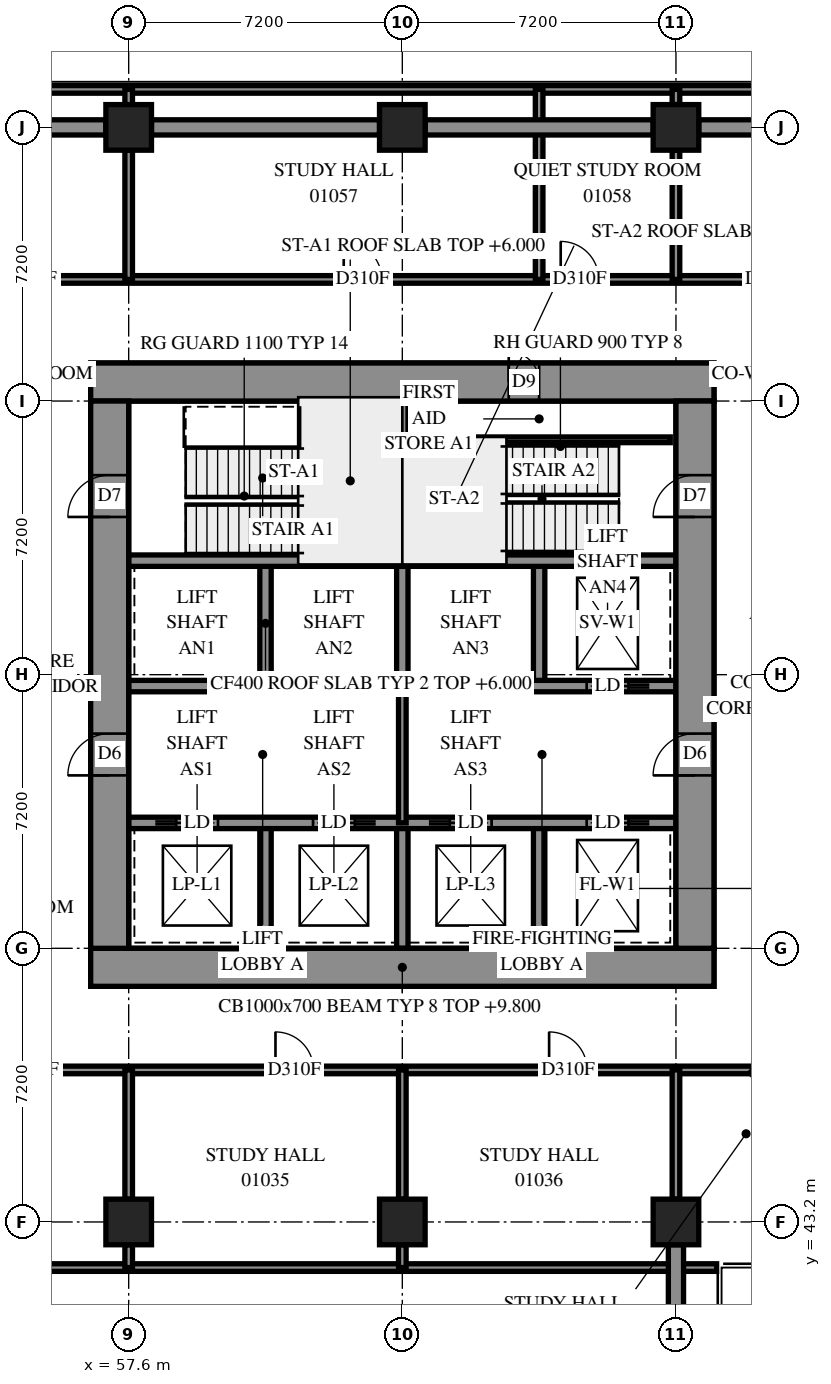
"""IFC4 building model, lengths in metres.
Left out: names, types, materials, properties, quantities, classifications, styles, units other than length and angle.
Written with IfcOpenShell. Run it as: python <this file> out.ifc"""

import sys

from ifc_helpers import new_model, si_unit, direction, frame, frame_2d, origin, origin_2d, place, context, subcontext, project, spatial, rectangle, extrude, element, fill, save


model = new_model("IFC4")
c1 = context("Model", 3, precision=1e-05, world=origin(), true_north=direction((0.0, 1.0)))
c2 = subcontext(c1, "Body", "Model", "MODEL_VIEW")
j1 = project(units=[si_unit("LENGTHUNIT", "METRE"), si_unit("PLANEANGLEUNIT", "RADIAN")], contexts=[c1])
p1 = place(None, origin())
s1 = spatial("IfcSite", under=j1, at=p1, CompositionType="ELEMENT")
p2 = place(p1, origin())
s2 = spatial("IfcBuilding", under=s1, at=p2, CompositionType="ELEMENT")
p3 = place(p2, frame((0.0, 0.0, 6.0)))
s3 = spatial("IfcBuildingStorey", under=s2, at=p3, CompositionType="ELEMENT", Elevation=6.0)
for number, where, z_axis, x_axis in (
    (1, (57.6, 43.2, 0.0), (0.0, 0.0, 1.0), (1.0, 0.0, 0.0)),
    (2, (57.6, 72.0, 0.0), (0.0, 0.0, 1.0), (1.0, 0.0, 0.0)),
    (3, (64.8, 43.2, 0.0), (0.0, 0.0, 1.0), (1.0, 0.0, 0.0)),
    (4, (64.8, 72.0, 0.0), (0.0, 0.0, 1.0), (1.0, 0.0, 0.0)),
    (5, (72.0, 43.2, 0.0), (0.0, 0.0, 1.0), (1.0, 0.0, 0.0)),
    (6, (72.0, 72.0, 0.0), (0.0, 0.0, 1.0), (1.0, 0.0, 0.0)),
):
    element("IfcColumn", number, at=place(p3, frame(where, z_axis=z_axis, x_axis=x_axis)), inside=s3, PredefinedType="COLUMN", context=c2, shape_type="SweptSolid", body=[
        extrude(rectangle(XDim=1.2, YDim=1.2, at=origin_2d()), origin(), (0.0, 0.0, 1.0), 3.8),
    ])
p4 = place(p3, frame((56.6, 49.9, -0.4), z_axis=(0.0, 0.0, 1.0), x_axis=(1.0, 0.0, 0.0)))
e7 = element("IfcWall", 7, at=p4, inside=s3, PredefinedType="SHEAR", context=c2, shape_type="SweptSolid", body=[
    extrude(rectangle(XDim=16.4, YDim=1.0, at=frame_2d((8.2, 0.0))), origin(), (0.0, 0.0, 1.0), 3.5),
])
p5 = place(p3, frame((56.6, 65.3, -0.4), z_axis=(0.0, 0.0, 1.0), x_axis=(1.0, 0.0, 0.0)))
e8 = element("IfcWall", 8, at=p5, inside=s3, PredefinedType="SHEAR", context=c2, shape_type="SweptSolid", body=[
    extrude(rectangle(XDim=16.4, YDim=1.0, at=frame_2d((8.2, 0.0))), origin(), (0.0, 0.0, 1.0), 3.5),
])
p6 = place(p5, frame((11.0, 0.0, 0.4)))
e9 = element("IfcOpeningElement", 9, at=p6, cuts=e8, PredefinedType="OPENING", context=c2, shape_type="SweptSolid", body=[
    extrude(rectangle(XDim=0.8, YDim=2.1, at=frame_2d((0.4, 1.05))), frame((0.0, 0.51, 0.0), z_axis=(0.0, -1.0, 0.0), x_axis=(1.0, 0.0, 0.0)), (0.0, 0.0, 1.0), 1.02),
])
p7 = place(p3, frame((57.1, 50.4, -0.4), z_axis=(0.0, 0.0, 1.0), x_axis=(0.0, 1.0, 0.0)))
e10 = element("IfcWall", 10, at=p7, inside=s3, PredefinedType="SHEAR", context=c2, shape_type="SweptSolid", body=[
    extrude(rectangle(XDim=14.4, YDim=1.0, at=frame_2d((7.2, 0.0))), origin(), (0.0, 0.0, 1.0), 3.5),
])
p8 = place(p7, frame((4.55, 0.0, 0.4)))
e11 = element("IfcOpeningElement", 11, at=p8, cuts=e10, PredefinedType="OPENING", context=c2, shape_type="SweptSolid", body=[
    extrude(rectangle(XDim=1.1, YDim=2.1, at=frame_2d((0.55, 1.05))), frame((0.0, 0.51, 0.0), z_axis=(0.0, -1.0, 0.0), x_axis=(1.0, 0.0, 0.0)), (0.0, 0.0, 1.0), 1.02),
])
p9 = place(p7, frame((11.35, 0.0, 0.4)))
e12 = element("IfcOpeningElement", 12, at=p9, cuts=e10, PredefinedType="OPENING", context=c2, shape_type="SweptSolid", body=[
    extrude(rectangle(XDim=1.1, YDim=2.1, at=frame_2d((0.55, 1.05))), frame((0.0, 0.51, 0.0), z_axis=(0.0, -1.0, 0.0), x_axis=(1.0, 0.0, 0.0)), (0.0, 0.0, 1.0), 1.02),
])
p10 = place(p3, frame((72.5, 50.4, -0.4), z_axis=(0.0, 0.0, 1.0), x_axis=(0.0, 1.0, 0.0)))
e13 = element("IfcWall", 13, at=p10, inside=s3, PredefinedType="SHEAR", context=c2, shape_type="SweptSolid", body=[
    extrude(rectangle(XDim=14.4, YDim=1.0, at=frame_2d((7.2, 0.0))), origin(), (0.0, 0.0, 1.0), 3.5),
])
p11 = place(p10, frame((4.55, 0.0, 0.4)))
e14 = element("IfcOpeningElement", 14, at=p11, cuts=e13, PredefinedType="OPENING", context=c2, shape_type="SweptSolid", body=[
    extrude(rectangle(XDim=1.1, YDim=2.1, at=frame_2d((0.55, 1.05))), frame((0.0, 0.51, 0.0), z_axis=(0.0, -1.0, 0.0), x_axis=(1.0, 0.0, 0.0)), (0.0, 0.0, 1.0), 1.02),
])
p12 = place(p10, frame((11.35, 0.0, 0.4)))
e15 = element("IfcOpeningElement", 15, at=p12, cuts=e13, PredefinedType="OPENING", context=c2, shape_type="SweptSolid", body=[
    extrude(rectangle(XDim=1.1, YDim=2.1, at=frame_2d((0.55, 1.05))), frame((0.0, 0.51, 0.0), z_axis=(0.0, -1.0, 0.0), x_axis=(1.0, 0.0, 0.0)), (0.0, 0.0, 1.0), 1.02),
])
for number, where, z_axis, x_axis in (
    (16, (61.2, 50.4, 0.0), (0.0, 0.0, 1.0), (0.0, 1.0, 0.0)),
    (17, (61.2, 57.3, 0.0), (0.0, 0.0, 1.0), (0.0, 1.0, 0.0)),
    (18, (64.8, 50.4, 0.0), (0.0, 0.0, 1.0), (0.0, 1.0, 0.0)),
    (19, (64.8, 57.3, 0.0), (0.0, 0.0, 1.0), (0.0, 1.0, 0.0)),
    (20, (68.4, 50.4, 0.0), (0.0, 0.0, 1.0), (0.0, 1.0, 0.0)),
    (21, (68.4, 57.3, 0.0), (0.0, 0.0, 1.0), (0.0, 1.0, 0.0)),
):
    element("IfcWall", number, at=place(p3, frame(where, z_axis=z_axis, x_axis=x_axis)), inside=s3, PredefinedType="SOLIDWALL", context=c2, shape_type="SweptSolid", body=[
        extrude(rectangle(XDim=3.3, YDim=0.3, at=frame_2d((1.65, 0.0))), origin(), (0.0, 0.0, 1.0), 3.8),
    ])
p13 = place(p3, frame((57.6, 53.7, 0.0), z_axis=(0.0, 0.0, 1.0), x_axis=(1.0, 0.0, 0.0)))
e22 = element("IfcWall", 22, at=p13, inside=s3, PredefinedType="SOLIDWALL", context=c2, shape_type="SweptSolid", body=[
    extrude(rectangle(XDim=14.4, YDim=0.3, at=frame_2d((7.2, 0.0))), origin(), (0.0, 0.0, 1.0), 3.8),
])
p14 = place(p13, frame((1.25, 0.0, 0.0)))
e23 = element("IfcOpeningElement", 23, at=p14, cuts=e22, PredefinedType="OPENING", context=c2, shape_type="SweptSolid", body=[
    extrude(rectangle(XDim=1.1, YDim=2.1, at=frame_2d((0.55, 1.05))), frame((0.0, 0.16, 0.0), z_axis=(0.0, -1.0, 0.0), x_axis=(1.0, 0.0, 0.0)), (0.0, 0.0, 1.0), 0.32),
])
p15 = place(p13, frame((4.85, 0.0, 0.0)))
e24 = element("IfcOpeningElement", 24, at=p15, cuts=e22, PredefinedType="OPENING", context=c2, shape_type="SweptSolid", body=[
    extrude(rectangle(XDim=1.1, YDim=2.1, at=frame_2d((0.55, 1.05))), frame((0.0, 0.16, 0.0), z_axis=(0.0, -1.0, 0.0), x_axis=(1.0, 0.0, 0.0)), (0.0, 0.0, 1.0), 0.32),
])
p16 = place(p13, frame((8.45, 0.0, 0.0)))
e25 = element("IfcOpeningElement", 25, at=p16, cuts=e22, PredefinedType="OPENING", context=c2, shape_type="SweptSolid", body=[
    extrude(rectangle(XDim=1.1, YDim=2.1, at=frame_2d((0.55, 1.05))), frame((0.0, 0.16, 0.0), z_axis=(0.0, -1.0, 0.0), x_axis=(1.0, 0.0, 0.0)), (0.0, 0.0, 1.0), 0.32),
])
p17 = place(p13, frame((12.05, 0.0, 0.0)))
e26 = element("IfcOpeningElement", 26, at=p17, cuts=e22, PredefinedType="OPENING", context=c2, shape_type="SweptSolid", body=[
    extrude(rectangle(XDim=1.1, YDim=2.1, at=frame_2d((0.55, 1.05))), frame((0.0, 0.16, 0.0), z_axis=(0.0, -1.0, 0.0), x_axis=(1.0, 0.0, 0.0)), (0.0, 0.0, 1.0), 0.32),
])
p18 = place(p3, frame((57.6, 57.3, 0.0), z_axis=(0.0, 0.0, 1.0), x_axis=(1.0, 0.0, 0.0)))
e27 = element("IfcWall", 27, at=p18, inside=s3, PredefinedType="SOLIDWALL", context=c2, shape_type="SweptSolid", body=[
    extrude(rectangle(XDim=14.4, YDim=0.3, at=frame_2d((7.2, 0.0))), origin(), (0.0, 0.0, 1.0), 3.8),
])
p19 = place(p18, frame((12.05, 0.0, 0.0)))
e28 = element("IfcOpeningElement", 28, at=p19, cuts=e27, PredefinedType="OPENING", context=c2, shape_type="SweptSolid", body=[
    extrude(rectangle(XDim=1.1, YDim=2.1, at=frame_2d((0.55, 1.05))), frame((0.0, 0.16, 0.0), z_axis=(0.0, -1.0, 0.0), x_axis=(1.0, 0.0, 0.0)), (0.0, 0.0, 1.0), 0.32),
])
for number, where, z_axis, x_axis in (
    (29, (57.6, 60.6, 0.0), (0.0, 0.0, 1.0), (1.0, 0.0, 0.0)),
    (30, (64.8, 60.6, 0.0), (0.0, 0.0, 1.0), (1.0, 0.0, 0.0)),
):
    element("IfcWall", number, at=place(p3, frame(where, z_axis=z_axis, x_axis=x_axis)), inside=s3, PredefinedType="SOLIDWALL", context=c2, shape_type="SweptSolid", body=[
        extrude(rectangle(XDim=7.2, YDim=0.3, at=frame_2d((3.6, 0.0))), origin(), (0.0, 0.0, 1.0), 3.8),
    ])
p20 = place(p3, frame((64.8, 60.6, 0.0), z_axis=(0.0, 0.0, 1.0), x_axis=(0.0, 1.0, 0.0)))
e31 = element("IfcWall", 31, at=p20, inside=s3, PredefinedType="SOLIDWALL", context=c2, shape_type="SweptSolid", body=[
    extrude(rectangle(XDim=4.2, YDim=0.3, at=frame_2d((2.1, 0.0))), origin(), (0.0, 0.0, 1.0), 3.8),
])
p21 = place(p3, frame((64.95, 63.78, 0.0), z_axis=(0.0, 0.0, 1.0), x_axis=(1.0, 0.0, 0.0)))
e32 = element("IfcWall", 32, at=p21, inside=s3, PredefinedType="PARTITIONING", context=c2, shape_type="SweptSolid", body=[
    extrude(rectangle(XDim=6.9, YDim=0.15, at=frame_2d((3.45, 0.0))), origin(), (0.0, 0.0, 1.0), 3.8),
])
p22 = place(p3, frame((64.8, 53.7, 0.0), z_axis=(0.0, 0.0, 1.0), x_axis=(0.0, 1.0, 0.0)))
e33 = element("IfcWall", 33, at=p22, inside=s3, PredefinedType="PARTITIONING", context=c2, shape_type="SweptSolid", body=[
    extrude(rectangle(XDim=3.6, YDim=0.2, at=frame_2d((1.8, 0.0))), origin(), (0.0, 0.0, 1.0), 3.8),
])
p23 = place(p3, frame((6.0, 73.0, 0.0), z_axis=(0.0, 0.0, 1.0), x_axis=(1.0, 0.0, 0.0)))
e34 = element("IfcWall", 34, at=p23, inside=s3, PredefinedType="PARTITIONING", context=c2, shape_type="SweptSolid", body=[
    extrude(rectangle(XDim=73.2, YDim=0.2, at=frame_2d((36.6, 0.0))), origin(), (0.0, 0.0, 1.0), 3.8),
])
p24 = place(p3, frame((13.33, 42.0, 0.0), z_axis=(0.0, 0.0, 1.0), x_axis=(1.0, 0.0, 0.0)))
e35 = element("IfcWall", 35, at=p24, inside=s3, PredefinedType="PARTITIONING", context=c2, shape_type="SweptSolid", body=[
    extrude(rectangle(XDim=59.74, YDim=0.2, at=frame_2d((29.87, 0.0))), origin(), (0.0, 0.0, 1.0), 3.8),
])
p25 = place(p3, frame((54.4, 68.0, 0.0), z_axis=(0.0, 0.0, 1.0), x_axis=(1.0, 0.0, 0.0)))
e36 = element("IfcWall", 36, at=p25, inside=s3, PredefinedType="PARTITIONING", context=c2, shape_type="SweptSolid", body=[
    extrude(rectangle(XDim=20.8, YDim=0.2, at=frame_2d((10.4, 0.0))), origin(), (0.0, 0.0, 1.0), 3.8),
])
p26 = place(p25, frame((0.121, 0.0, 0.0)))
e37 = element("IfcOpeningElement", 37, at=p26, cuts=e36, PredefinedType="OPENING", context=c2, shape_type="SweptSolid", body=[
    extrude(rectangle(XDim=1.0, YDim=2.1, at=frame_2d((0.5, 1.05))), frame((0.0, 0.11, 0.0), z_axis=(0.0, -1.0, 0.0), x_axis=(1.0, 0.0, 0.0)), (0.0, 0.0, 1.0), 0.22),
])
p27 = place(p25, frame((19.622, 0.0, 0.0)))
e38 = element("IfcOpeningElement", 38, at=p27, cuts=e36, PredefinedType="OPENING", context=c2, shape_type="SweptSolid", body=[
    extrude(rectangle(XDim=1.0, YDim=2.1, at=frame_2d((0.5, 1.05))), frame((0.0, 0.11, 0.0), z_axis=(0.0, -1.0, 0.0), x_axis=(1.0, 0.0, 0.0)), (0.0, 0.0, 1.0), 0.22),
])
p28 = place(p25, frame((8.858, 0.0, 0.0)))
e39 = element("IfcOpeningElement", 39, at=p28, cuts=e36, PredefinedType="OPENING", context=c2, shape_type="SweptSolid", body=[
    extrude(rectangle(XDim=1.0, YDim=2.1, at=frame_2d((0.5, 1.05))), frame((0.0, 0.11, 0.0), z_axis=(0.0, -1.0, 0.0), x_axis=(1.0, 0.0, 0.0)), (0.0, 0.0, 1.0), 0.22),
])
p29 = place(p25, frame((14.568, 0.0, 0.0)))
e40 = element("IfcOpeningElement", 40, at=p29, cuts=e36, PredefinedType="OPENING", context=c2, shape_type="SweptSolid", body=[
    extrude(rectangle(XDim=1.0, YDim=2.1, at=frame_2d((0.5, 1.05))), frame((0.0, 0.11, 0.0), z_axis=(0.0, -1.0, 0.0), x_axis=(1.0, 0.0, 0.0)), (0.0, 0.0, 1.0), 0.22),
])
p30 = place(p3, frame((54.4, 47.2, 0.0), z_axis=(0.0, 0.0, 1.0), x_axis=(1.0, 0.0, 0.0)))
e41 = element("IfcWall", 41, at=p30, inside=s3, PredefinedType="PARTITIONING", context=c2, shape_type="SweptSolid", body=[
    extrude(rectangle(XDim=19.618, YDim=0.2, at=frame_2d((9.809, 0.0))), origin(), (0.0, 0.0, 1.0), 3.8),
])
p31 = place(p30, frame((0.178, 0.0, 0.0)))
e42 = element("IfcOpeningElement", 42, at=p31, cuts=e41, PredefinedType="OPENING", context=c2, shape_type="SweptSolid", body=[
    extrude(rectangle(XDim=1.0, YDim=2.1, at=frame_2d((0.5, 1.05))), frame((0.0, 0.11, 0.0), z_axis=(0.0, -1.0, 0.0), x_axis=(1.0, 0.0, 0.0)), (0.0, 0.0, 1.0), 0.22),
])
p32 = place(p30, frame((7.062, 0.0, 0.0)))
e43 = element("IfcOpeningElement", 43, at=p32, cuts=e41, PredefinedType="OPENING", context=c2, shape_type="SweptSolid", body=[
    extrude(rectangle(XDim=1.0, YDim=2.1, at=frame_2d((0.5, 1.05))), frame((0.0, 0.11, 0.0), z_axis=(0.0, -1.0, 0.0), x_axis=(1.0, 0.0, 0.0)), (0.0, 0.0, 1.0), 0.22),
])
p33 = place(p30, frame((14.262, 0.0, 0.0)))
e44 = element("IfcOpeningElement", 44, at=p33, cuts=e41, PredefinedType="OPENING", context=c2, shape_type="SweptSolid", body=[
    extrude(rectangle(XDim=1.0, YDim=2.1, at=frame_2d((0.5, 1.05))), frame((0.0, 0.11, 0.0), z_axis=(0.0, -1.0, 0.0), x_axis=(1.0, 0.0, 0.0)), (0.0, 0.0, 1.0), 0.22),
])
p34 = place(p3, frame((68.4, 68.0, 0.0), z_axis=(0.0, 0.0, 1.0), x_axis=(0.0, 1.0, 0.0)))
e45 = element("IfcWall", 45, at=p34, inside=s3, PredefinedType="PARTITIONING", context=c2, shape_type="SweptSolid", body=[
    extrude(rectangle(XDim=5.0, YDim=0.2, at=frame_2d((2.5, 0.0))), origin(), (0.0, 0.0, 1.0), 3.8),
])
p35 = place(p3, frame((74.015, 47.197, 0.0), z_axis=(0.0, 0.0, 1.0), x_axis=(0.7071067812, -0.7071067812, 0.0)))
e46 = element("IfcWall", 46, at=p35, inside=s3, PredefinedType="PARTITIONING", context=c2, shape_type="SweptSolid", body=[
    extrude(rectangle(XDim=4.712, YDim=0.2, at=frame_2d((2.356, 0.0))), origin(), (0.0, 0.0, 1.0), 3.8),
])
p36 = place(p35, frame((0.468, 0.0, 0.0)))
e47 = element("IfcOpeningElement", 47, at=p36, cuts=e46, PredefinedType="OPENING", context=c2, shape_type="SweptSolid", body=[
    extrude(rectangle(XDim=1.0, YDim=2.1, at=frame_2d((0.5, 1.05))), frame((0.0, 0.11, 0.0), z_axis=(0.0, -1.0, 0.0), x_axis=(1.0, 0.0, 0.0)), (0.0, 0.0, 1.0), 0.22),
])
for number, where, z_axis, x_axis in (
    (48, (57.6, 43.8, 0.0), (0.0, 0.0, 1.0), (0.0, 1.0, 0.0)),
    (49, (57.6, 68.0, 0.0), (0.0, 0.0, 1.0), (0.0, 1.0, 0.0)),
    (50, (64.8, 43.8, 0.0), (0.0, 0.0, 1.0), (0.0, 1.0, 0.0)),
    (51, (72.0, 43.8, 0.0), (0.0, 0.0, 1.0), (0.0, 1.0, 0.0)),
    (52, (72.0, 68.0, 0.0), (0.0, 0.0, 1.0), (0.0, 1.0, 0.0)),
):
    element("IfcWall", number, at=place(p3, frame(where, z_axis=z_axis, x_axis=x_axis)), inside=s3, PredefinedType="PARTITIONING", context=c2, shape_type="SweptSolid", body=[
        extrude(rectangle(XDim=3.4, YDim=0.2, at=frame_2d((1.7, 0.0))), origin(), (0.0, 0.0, 1.0), 3.8),
    ])
for number, where, z_axis, x_axis in (
    (53, (57.6, 42.0, 0.0), (0.0, 0.0, 1.0), (0.0, 1.0, 0.0)),
    (54, (64.8, 42.0, 0.0), (0.0, 0.0, 1.0), (0.0, 1.0, 0.0)),
):
    element("IfcWall", number, at=place(p3, frame(where, z_axis=z_axis, x_axis=x_axis)), inside=s3, PredefinedType="PARTITIONING", context=c2, shape_type="SweptSolid", body=[
        extrude(rectangle(XDim=0.6, YDim=0.2, at=frame_2d((0.3, 0.0))), origin(), (0.0, 0.0, 1.0), 3.8),
    ])
p37 = place(p3, frame((72.0, 42.0, 0.0), z_axis=(0.0, 0.0, 1.0), x_axis=(0.0, 1.0, 0.0)))
e55 = element("IfcWall", 55, at=p37, inside=s3, PredefinedType="PARTITIONING", context=c2, shape_type="SweptSolid", body=[
    extrude(rectangle(XDim=0.6, YDim=0.2, at=frame_2d((0.3, 0.0))), origin(), (0.0, 0.0, 1.0), 3.2),
])
for number, where, z_axis, x_axis in (
    (56, (57.6, 72.6, 0.0), (0.0, 0.0, 1.0), (0.0, 1.0, 0.0)),
    (57, (72.0, 72.6, 0.0), (0.0, 0.0, 1.0), (0.0, 1.0, 0.0)),
):
    element("IfcWall", number, at=place(p3, frame(where, z_axis=z_axis, x_axis=x_axis)), inside=s3, PredefinedType="PARTITIONING", context=c2, shape_type="SweptSolid", body=[
        extrude(rectangle(XDim=0.4, YDim=0.2, at=frame_2d((0.2, 0.0))), origin(), (0.0, 0.0, 1.0), 3.8),
    ])
p38 = place(p6, origin())
e58 = element("IfcDoor", 58, at=p38, inside=s3, OperationType="SINGLE_SWING_RIGHT", PredefinedType="DOOR", context=c2, shape_type="SweptSolid", body=[
    extrude(rectangle(XDim=0.8, YDim=2.1, at=frame_2d((0.4, 1.05))), frame((0.0, -0.44, 0.0), z_axis=(0.0, -1.0, 0.0), x_axis=(1.0, 0.0, 0.0)), (0.0, 0.0, 1.0), 0.05),
])
fill(e9, e58)
p39 = place(p8, origin())
e59 = element("IfcDoor", 59, at=p39, inside=s3, OperationType="DOUBLE_DOOR_SINGLE_SWING", PredefinedType="DOOR", context=c2, shape_type="SweptSolid", body=[
    extrude(rectangle(XDim=1.1, YDim=2.1, at=frame_2d((0.55, 1.05))), frame((0.0, 0.025, 0.0), z_axis=(0.0, -1.0, 0.0), x_axis=(1.0, 0.0, 0.0)), (0.0, 0.0, 1.0), 0.05),
])
fill(e11, e59)
p40 = place(p11, origin())
e60 = element("IfcDoor", 60, at=p40, inside=s3, OperationType="DOUBLE_DOOR_SINGLE_SWING", PredefinedType="DOOR", context=c2, shape_type="SweptSolid", body=[
    extrude(rectangle(XDim=1.1, YDim=2.1, at=frame_2d((0.55, 1.05))), frame((0.0, 0.025, 0.0), z_axis=(0.0, -1.0, 0.0), x_axis=(1.0, 0.0, 0.0)), (0.0, 0.0, 1.0), 0.05),
])
fill(e14, e60)
p41 = place(p9, origin())
e61 = element("IfcDoor", 61, at=p41, inside=s3, OperationType="SINGLE_SWING_LEFT", PredefinedType="DOOR", context=c2, shape_type="SweptSolid", body=[
    extrude(rectangle(XDim=1.1, YDim=2.1, at=frame_2d((0.55, 1.05))), frame((0.0, 0.025, 0.0), z_axis=(0.0, -1.0, 0.0), x_axis=(1.0, 0.0, 0.0)), (0.0, 0.0, 1.0), 0.05),
])
fill(e12, e61)
p42 = place(p12, origin())
e62 = element("IfcDoor", 62, at=p42, inside=s3, OperationType="SINGLE_SWING_RIGHT", PredefinedType="DOOR", context=c2, shape_type="SweptSolid", body=[
    extrude(rectangle(XDim=1.1, YDim=2.1, at=frame_2d((0.55, 1.05))), frame((0.0, 0.025, 0.0), z_axis=(0.0, -1.0, 0.0), x_axis=(1.0, 0.0, 0.0)), (0.0, 0.0, 1.0), 0.05),
])
fill(e15, e62)
p43 = place(p14, origin())
e63 = element("IfcDoor", 63, at=p43, inside=s3, OperationType="SLIDING_TO_LEFT", PredefinedType="DOOR", context=c2, shape_type="SweptSolid", body=[
    extrude(rectangle(XDim=1.1, YDim=2.1, at=frame_2d((0.55, 1.05))), frame((0.0, 0.025, 0.0), z_axis=(0.0, -1.0, 0.0), x_axis=(1.0, 0.0, 0.0)), (0.0, 0.0, 1.0), 0.05),
])
fill(e23, e63)
p44 = place(p15, origin())
e64 = element("IfcDoor", 64, at=p44, inside=s3, OperationType="SLIDING_TO_RIGHT", PredefinedType="DOOR", context=c2, shape_type="SweptSolid", body=[
    extrude(rectangle(XDim=1.1, YDim=2.1, at=frame_2d((0.55, 1.05))), frame((0.0, 0.025, 0.0), z_axis=(0.0, -1.0, 0.0), x_axis=(1.0, 0.0, 0.0)), (0.0, 0.0, 1.0), 0.05),
])
fill(e24, e64)
p45 = place(p16, origin())
e65 = element("IfcDoor", 65, at=p45, inside=s3, OperationType="SLIDING_TO_LEFT", PredefinedType="DOOR", context=c2, shape_type="SweptSolid", body=[
    extrude(rectangle(XDim=1.1, YDim=2.1, at=frame_2d((0.55, 1.05))), frame((0.0, 0.025, 0.0), z_axis=(0.0, -1.0, 0.0), x_axis=(1.0, 0.0, 0.0)), (0.0, 0.0, 1.0), 0.05),
])
fill(e25, e65)
p46 = place(p17, origin())
e66 = element("IfcDoor", 66, at=p46, inside=s3, OperationType="SLIDING_TO_RIGHT", PredefinedType="DOOR", context=c2, shape_type="SweptSolid", body=[
    extrude(rectangle(XDim=1.1, YDim=2.1, at=frame_2d((0.55, 1.05))), frame((0.0, 0.025, 0.0), z_axis=(0.0, -1.0, 0.0), x_axis=(1.0, 0.0, 0.0)), (0.0, 0.0, 1.0), 0.05),
])
fill(e26, e66)
p47 = place(p19, origin())
e67 = element("IfcDoor", 67, at=p47, inside=s3, OperationType="SLIDING_TO_RIGHT", PredefinedType="DOOR", context=c2, shape_type="SweptSolid", body=[
    extrude(rectangle(XDim=1.1, YDim=2.1, at=frame_2d((0.55, 1.05))), frame((0.0, 0.025, 0.0), z_axis=(0.0, -1.0, 0.0), x_axis=(1.0, 0.0, 0.0)), (0.0, 0.0, 1.0), 0.05),
])
fill(e28, e67)
p48 = place(p32, origin())
e68 = element("IfcDoor", 68, at=p48, inside=s3, OperationType="SINGLE_SWING_LEFT", PredefinedType="DOOR", context=c2, shape_type="SweptSolid", body=[
    extrude(rectangle(XDim=1.0, YDim=2.1, at=frame_2d((0.5, 1.05))), frame((0.0, 0.025, 0.0), z_axis=(0.0, -1.0, 0.0), x_axis=(1.0, 0.0, 0.0)), (0.0, 0.0, 1.0), 0.05),
])
fill(e43, e68)
p49 = place(p33, origin())
e69 = element("IfcDoor", 69, at=p49, inside=s3, OperationType="SINGLE_SWING_LEFT", PredefinedType="DOOR", context=c2, shape_type="SweptSolid", body=[
    extrude(rectangle(XDim=1.0, YDim=2.1, at=frame_2d((0.5, 1.05))), frame((0.0, 0.025, 0.0), z_axis=(0.0, -1.0, 0.0), x_axis=(1.0, 0.0, 0.0)), (0.0, 0.0, 1.0), 0.05),
])
fill(e44, e69)
p50 = place(p28, origin())
e70 = element("IfcDoor", 70, at=p50, inside=s3, OperationType="SINGLE_SWING_RIGHT", PredefinedType="DOOR", context=c2, shape_type="SweptSolid", body=[
    extrude(rectangle(XDim=1.0, YDim=2.1, at=frame_2d((0.5, 1.05))), frame((0.0, 0.025, 0.0), z_axis=(0.0, -1.0, 0.0), x_axis=(1.0, 0.0, 0.0)), (0.0, 0.0, 1.0), 0.05),
])
fill(e39, e70)
p51 = place(p29, origin())
e71 = element("IfcDoor", 71, at=p51, inside=s3, OperationType="SINGLE_SWING_LEFT", PredefinedType="DOOR", context=c2, shape_type="SweptSolid", body=[
    extrude(rectangle(XDim=1.0, YDim=2.1, at=frame_2d((0.5, 1.05))), frame((0.0, 0.025, 0.0), z_axis=(0.0, -1.0, 0.0), x_axis=(1.0, 0.0, 0.0)), (0.0, 0.0, 1.0), 0.05),
])
fill(e40, e71)
save(model, sys.argv[1])
